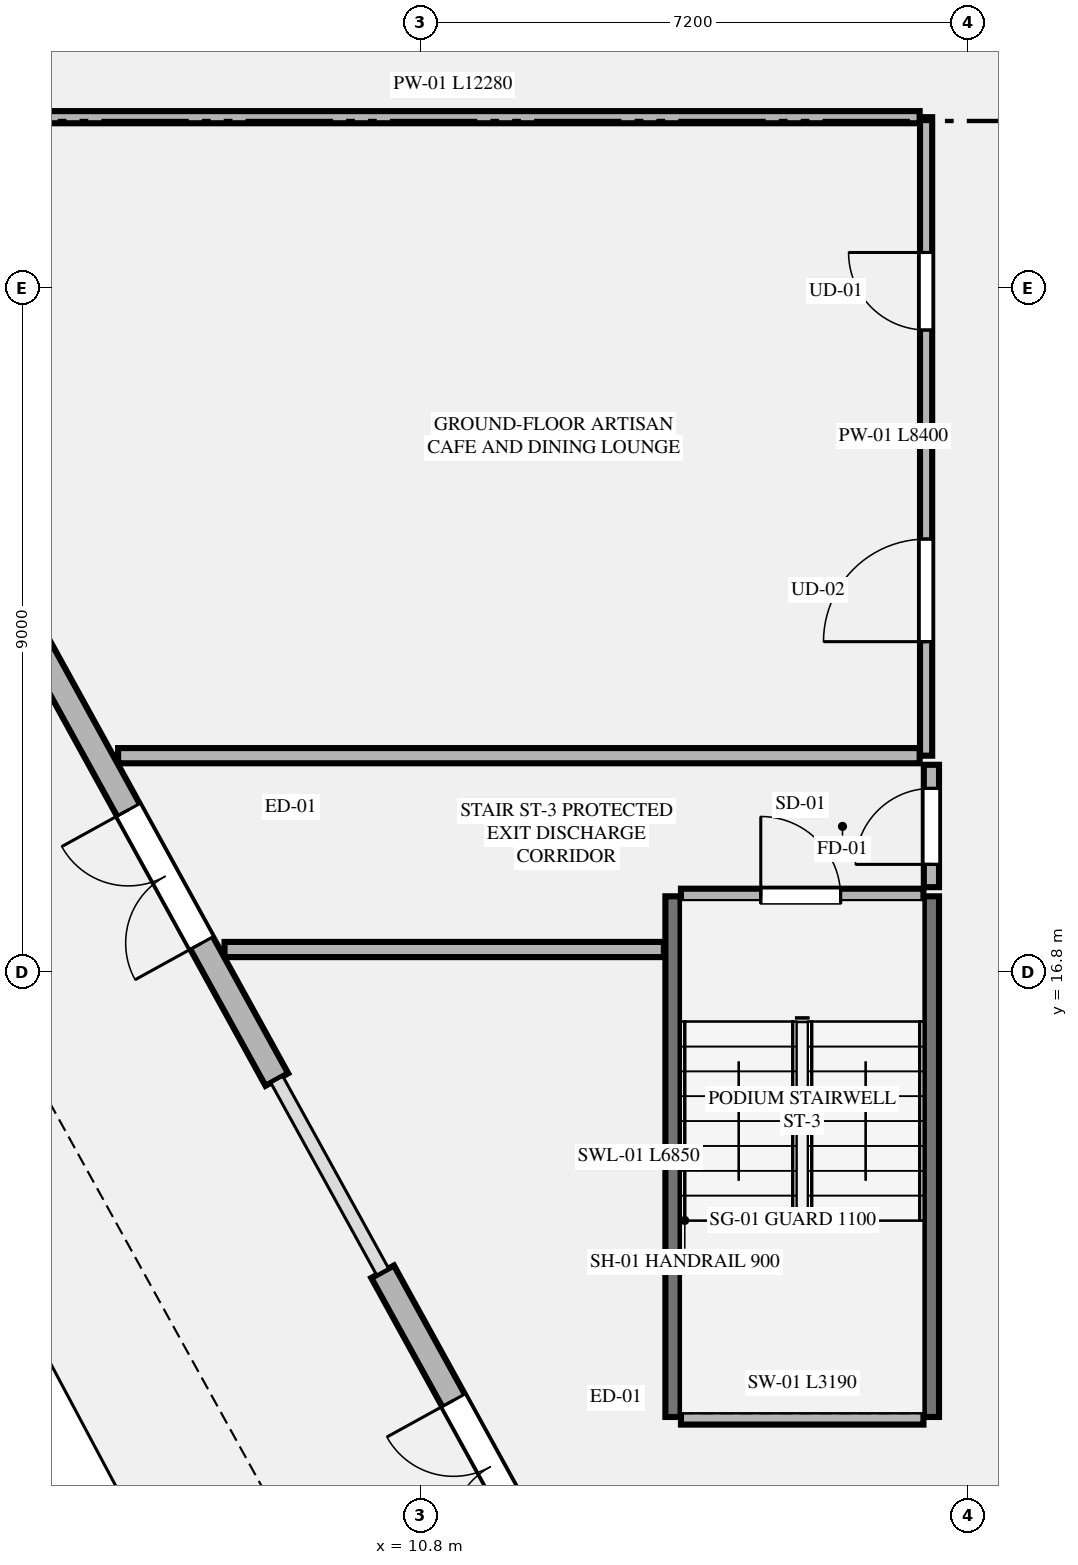
"""IFC4 building model, lengths in metres.
Left out: names, types, materials, properties, quantities, classifications, styles, units other than length and angle.
Written with IfcOpenShell. Run it as: python <this file> out.ifc"""

import sys

from ifc_helpers import new_model, si_unit, direction, frame, frame_2d, origin, place, context, subcontext, project, spatial, rectangle, extrude, element, fill, save


model = new_model("IFC4")
c1 = context("Model", 3, precision=1e-05, world=origin(), true_north=direction((0.0, 1.0)))
c2 = subcontext(c1, "Body", "Model", "MODEL_VIEW")
j1 = project(units=[si_unit("LENGTHUNIT", "METRE"), si_unit("PLANEANGLEUNIT", "RADIAN")], contexts=[c1])
p1 = place(None, origin())
s1 = spatial("IfcSite", under=j1, at=p1, CompositionType="ELEMENT")
p2 = place(p1, origin())
s2 = spatial("IfcBuilding", under=s1, at=p2, CompositionType="ELEMENT")
p3 = place(p2, origin())
s3 = spatial("IfcBuildingStorey", under=s2, at=p3, CompositionType="ELEMENT", Elevation=0.0)
for number, where, z_axis, x_axis in (
    (1, (14.12, 10.95, 0.0), (0.0, 0.0, 1.0), (0.0, 1.0, 0.0)),
    (2, (17.52, 10.95, 0.0), (0.0, 0.0, 1.0), (0.0, 1.0, 0.0)),
):
    element("IfcWall", number, at=place(p3, frame(where, z_axis=z_axis, x_axis=x_axis)), inside=s3, PredefinedType="SHEAR", context=c2, shape_type="SweptSolid", body=[
        extrude(rectangle(XDim=6.85, YDim=0.2, at=frame_2d((3.425, 0.0))), origin(), (0.0, 0.0, 1.0), 6.0),
    ])
p4 = place(p3, frame((14.225, 10.95, 0.0), z_axis=(0.0, 0.0, 1.0), x_axis=(1.0, 0.0, 0.0)))
e3 = element("IfcWall", 3, at=p4, inside=s3, PredefinedType="PLUMBINGWALL", context=c2, shape_type="SweptSolid", body=[
    extrude(rectangle(XDim=3.19, YDim=0.2, at=frame_2d((1.595, 0.0))), origin(), (0.0, 0.0, 1.0), 5.75),
])
p5 = place(p3, frame((14.225, 17.8, 0.0), z_axis=(0.0, 0.0, 1.0), x_axis=(1.0, 0.0, 0.0)))
e4 = element("IfcWall", 4, at=p5, inside=s3, PredefinedType="PLUMBINGWALL", context=c2, shape_type="SweptSolid", body=[
    extrude(rectangle(XDim=3.19, YDim=0.2, at=frame_2d((1.595, 0.0))), origin(), (0.0, 0.0, 1.0), 5.75),
])
p6 = place(p5, frame((1.05, 0.0, 0.0)))
e5 = element("IfcOpeningElement", 5, at=p6, cuts=e4, PredefinedType="OPENING", context=c2, shape_type="SweptSolid", body=[
    extrude(rectangle(XDim=1.05, YDim=2.15, at=frame_2d((0.525, 1.075))), frame((0.0, 0.11, 0.0), z_axis=(0.0, -1.0, 0.0), x_axis=(1.0, 0.0, 0.0)), (0.0, 0.0, 1.0), 0.22),
])
p7 = place(p3, frame((17.45, 19.65, 0.0), z_axis=(0.0, 0.0, 1.0), x_axis=(0.0, 1.0, 0.0)))
e6 = element("IfcWall", 6, at=p7, inside=s3, PredefinedType="PARTITIONING", context=c2, shape_type="SweptSolid", body=[
    extrude(rectangle(XDim=8.4, YDim=0.16, at=frame_2d((4.2, 0.0))), origin(), (0.0, 0.0, 1.0), 5.283),
])
p8 = place(p7, frame((1.5, 0.0, 0.0)))
e7 = element("IfcOpeningElement", 7, at=p8, cuts=e6, PredefinedType="OPENING", context=c2, shape_type="SweptSolid", body=[
    extrude(rectangle(XDim=1.35, YDim=2.35, at=frame_2d((0.675, 1.175))), frame((0.0, 0.09, 0.0), z_axis=(0.0, -1.0, 0.0), x_axis=(1.0, 0.0, 0.0)), (0.0, 0.0, 1.0), 0.18),
])
p9 = place(p7, frame((5.6, 0.0, 0.0)))
e8 = element("IfcOpeningElement", 8, at=p9, cuts=e6, PredefinedType="OPENING", context=c2, shape_type="SweptSolid", body=[
    extrude(rectangle(XDim=1.02, YDim=2.25, at=frame_2d((0.51, 1.125))), frame((0.0, 0.09, 0.0), z_axis=(0.0, -1.0, 0.0), x_axis=(1.0, 0.0, 0.0)), (0.0, 0.0, 1.0), 0.18),
])
p10 = place(p3, frame((5.085, 28.05, 0.0), z_axis=(0.0, 0.0, 1.0), x_axis=(1.0, 0.0, 0.0)))
e9 = element("IfcWall", 9, at=p10, inside=s3, PredefinedType="PARTITIONING", context=c2, shape_type="SweptSolid", body=[
    extrude(rectangle(XDim=12.28, YDim=0.16, at=frame_2d((6.14, 0.0))), origin(), (0.0, 0.0, 1.0), 5.75),
])
p11 = place(p3, frame((6.82, 19.65, 0.0), z_axis=(0.0, 0.0, 1.0), x_axis=(1.0, 0.0, 0.0)))
e10 = element("IfcWall", 10, at=p11, inside=s3, PredefinedType="PLUMBINGWALL", context=c2, shape_type="SweptSolid", body=[
    extrude(rectangle(XDim=10.545, YDim=0.2, at=frame_2d((5.272, 0.0))), origin(), (0.0, 0.0, 1.0), 4.978),
])
p12 = place(p3, frame((8.22, 17.1, 0.0), z_axis=(0.0, 0.0, 1.0), x_axis=(1.0, 0.0, 0.0)))
e11 = element("IfcWall", 11, at=p12, inside=s3, PredefinedType="PLUMBINGWALL", context=c2, shape_type="SweptSolid", body=[
    extrude(rectangle(XDim=5.78, YDim=0.2, at=frame_2d((2.89, 0.0))), origin(), (0.0, 0.0, 1.0), 5.75),
])
p13 = place(p3, frame((17.52, 17.92, 0.0), z_axis=(0.0, 0.0, 1.0), x_axis=(0.0, 1.0, 0.0)))
e12 = element("IfcWall", 12, at=p13, inside=s3, PredefinedType="PLUMBINGWALL", context=c2, shape_type="SweptSolid", body=[
    extrude(rectangle(XDim=1.61, YDim=0.2, at=frame_2d((0.805, 0.0))), origin(), (0.0, 0.0, 1.0), 5.75),
])
p14 = place(p13, frame((0.3, 0.0, 0.0)))
e13 = element("IfcOpeningElement", 13, at=p14, cuts=e12, PredefinedType="OPENING", context=c2, shape_type="SweptSolid", body=[
    extrude(rectangle(XDim=1.0, YDim=2.15, at=frame_2d((0.5, 1.075))), frame((0.0, 0.11, 0.0), z_axis=(0.0, -1.0, 0.0), x_axis=(1.0, 0.0, 0.0)), (0.0, 0.0, 1.0), 0.22),
])
p15 = place(p3, frame((3.804, 26.942, 0.0), z_axis=(0.0, 0.0, 1.0), x_axis=(0.482427040838, 0.875936156502, 0.0)))
e14 = element("IfcWall", 14, at=p15, inside=s3, PredefinedType="STANDARD", context=c2, shape_type="SweptSolid", body=[
    extrude(rectangle(XDim=10.582, YDim=0.34, at=frame_2d((5.291, 0.0))), origin(), (0.0, 0.0, 1.0), 5.75),
])
p16 = place(p15, frame((2.2, 0.0, 0.0)))
e15 = element("IfcOpeningElement", 15, at=p16, cuts=e14, PredefinedType="OPENING", context=c2, shape_type="SweptSolid", body=[
    extrude(rectangle(XDim=6.0, YDim=3.2, at=frame_2d((3.0, 1.6))), frame((0.0, 0.18, 0.0), z_axis=(0.0, -1.0, 0.0), x_axis=(1.0, 0.0, 0.0)), (0.0, 0.0, 1.0), 0.36),
])
p17 = place(p3, frame((15.405, 3.592, 0.0), z_axis=(0.0, 0.0, 1.0), x_axis=(-0.482427040838, 0.875936156502, 0.0)))
e16 = element("IfcWall", 16, at=p17, inside=s3, PredefinedType="STANDARD", context=c2, shape_type="SweptSolid", body=[
    extrude(rectangle(XDim=10.582, YDim=0.34, at=frame_2d((5.291, 0.0))), origin(), (0.0, 0.0, 1.0), 5.75),
])
p18 = place(p17, frame((6.65, 0.0, 0.0)))
e17 = element("IfcOpeningElement", 17, at=p18, cuts=e16, PredefinedType="OPENING", context=c2, shape_type="SweptSolid", body=[
    extrude(rectangle(XDim=2.0, YDim=2.4, at=frame_2d((1.0, 1.2))), frame((0.0, 0.18, 0.0), z_axis=(0.0, -1.0, 0.0), x_axis=(1.0, 0.0, 0.0)), (0.0, 0.0, 1.0), 0.36),
])
p19 = place(p17, frame((0.5, 0.0, 0.0)))
e18 = element("IfcOpeningElement", 18, at=p19, cuts=e16, PredefinedType="OPENING", context=c2, shape_type="SweptSolid", body=[
    extrude(rectangle(XDim=3.2, YDim=2.6, at=frame_2d((1.6, 1.3))), frame((0.0, 0.18, 0.0), z_axis=(0.0, -1.0, 0.0), x_axis=(1.0, 0.0, 0.0)), (0.0, 0.0, 1.0), 0.36),
])
p20 = place(p3, frame((8.908, 15.389, 0.0), z_axis=(0.0, 0.0, 1.0), x_axis=(-0.48235622808, 0.875975153319, 0.0)))
e19 = element("IfcWall", 19, at=p20, inside=s3, PredefinedType="STANDARD", context=c2, shape_type="SweptSolid", body=[
    extrude(rectangle(XDim=10.581, YDim=0.34, at=frame_2d((5.291, 0.0))), origin(), (0.0, 0.0, 1.0), 5.75),
])
p21 = place(p20, frame((2.05, 0.0, 0.0)))
e20 = element("IfcOpeningElement", 20, at=p21, cuts=e19, PredefinedType="OPENING", context=c2, shape_type="SweptSolid", body=[
    extrude(rectangle(XDim=2.0, YDim=2.4, at=frame_2d((1.0, 1.2))), frame((0.0, 0.18, 0.0), z_axis=(0.0, -1.0, 0.0), x_axis=(1.0, 0.0, 0.0)), (0.0, 0.0, 1.0), 0.36),
])
p22 = place(p6, origin())
e21 = element("IfcDoor", 21, at=p22, inside=s3, OperationType="SINGLE_SWING_LEFT", PredefinedType="DOOR", context=c2, shape_type="SweptSolid", body=[
    extrude(rectangle(XDim=1.05, YDim=2.15, at=frame_2d((0.525, 1.075))), frame((0.0, 0.025, 0.0), z_axis=(0.0, -1.0, 0.0), x_axis=(1.0, 0.0, 0.0)), (0.0, 0.0, 1.0), 0.05),
])
fill(e5, e21)
p23 = place(p14, origin())
e22 = element("IfcDoor", 22, at=p23, inside=s3, OperationType="SINGLE_SWING_LEFT", PredefinedType="DOOR", context=c2, shape_type="SweptSolid", body=[
    extrude(rectangle(XDim=1.0, YDim=2.15, at=frame_2d((0.5, 1.075))), frame((0.0, 0.025, 0.0), z_axis=(0.0, -1.0, 0.0), x_axis=(1.0, 0.0, 0.0)), (0.0, 0.0, 1.0), 0.05),
])
fill(e13, e22)
p24 = place(p8, origin())
e23 = element("IfcDoor", 23, at=p24, inside=s3, OperationType="SINGLE_SWING_LEFT", PredefinedType="DOOR", context=c2, shape_type="SweptSolid", body=[
    extrude(rectangle(XDim=1.35, YDim=2.35, at=frame_2d((0.675, 1.175))), frame((0.0, 0.025, 0.0), z_axis=(0.0, -1.0, 0.0), x_axis=(1.0, 0.0, 0.0)), (0.0, 0.0, 1.0), 0.05),
])
fill(e7, e23)
p25 = place(p9, origin())
e24 = element("IfcDoor", 24, at=p25, inside=s3, OperationType="SINGLE_SWING_RIGHT", PredefinedType="DOOR", context=c2, shape_type="SweptSolid", body=[
    extrude(rectangle(XDim=1.02, YDim=2.25, at=frame_2d((0.51, 1.125))), frame((0.0, 0.025, 0.0), z_axis=(0.0, -1.0, 0.0), x_axis=(1.0, 0.0, 0.0)), (0.0, 0.0, 1.0), 0.05),
])
fill(e8, e24)
p26 = place(p16, origin())
e25 = element("IfcDoor", 25, at=p26, inside=s3, OperationType="ROLLINGUP", PredefinedType="GATE", context=c2, shape_type="SweptSolid", body=[
    extrude(rectangle(XDim=6.0, YDim=3.2, at=frame_2d((3.0, 1.6))), frame((0.0, 0.025, 0.0), z_axis=(0.0, -1.0, 0.0), x_axis=(1.0, 0.0, 0.0)), (0.0, 0.0, 1.0), 0.05),
])
fill(e15, e25)
p27 = place(p18, origin())
e26 = element("IfcDoor", 26, at=p27, inside=s3, OperationType="DOUBLE_DOOR_SINGLE_SWING", PredefinedType="DOOR", context=c2, shape_type="SweptSolid", body=[
    extrude(rectangle(XDim=2.0, YDim=2.4, at=frame_2d((1.0, 1.2))), frame((0.0, 0.025, 0.0), z_axis=(0.0, -1.0, 0.0), x_axis=(1.0, 0.0, 0.0)), (0.0, 0.0, 1.0), 0.05),
])
fill(e17, e26)
p28 = place(p21, origin())
e27 = element("IfcDoor", 27, at=p28, inside=s3, OperationType="DOUBLE_DOOR_SINGLE_SWING", PredefinedType="DOOR", context=c2, shape_type="SweptSolid", body=[
    extrude(rectangle(XDim=2.0, YDim=2.4, at=frame_2d((1.0, 1.2))), frame((0.0, 0.025, 0.0), z_axis=(0.0, -1.0, 0.0), x_axis=(1.0, 0.0, 0.0)), (0.0, 0.0, 1.0), 0.05),
])
fill(e20, e27)
save(model, sys.argv[1])
